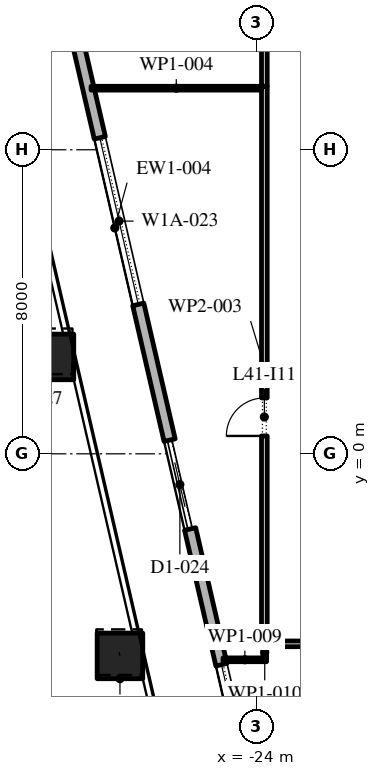
"""IFC4 building model, lengths in metres.
Left out: names, types, materials, properties, quantities, classifications, styles, units other than length and angle.
Written with IfcOpenShell. Run it as: python <this file> out.ifc"""

import sys

from ifc_helpers import new_model, si_unit, direction, frame, frame_2d, origin, origin_2d, place, context, subcontext, project, spatial, rectangle, extrude, element, fill, save


model = new_model("IFC4")
c1 = context("Model", 3, precision=1e-05, world=origin(), true_north=direction((0.0, 1.0)))
c2 = subcontext(c1, "Body", "Model", "MODEL_VIEW")
j1 = project(units=[si_unit("LENGTHUNIT", "METRE"), si_unit("PLANEANGLEUNIT", "RADIAN")], contexts=[c1])
p1 = place(None, origin())
s1 = spatial("IfcSite", under=j1, at=p1, CompositionType="ELEMENT")
p2 = place(p1, origin())
s2 = spatial("IfcBuilding", under=s1, at=p2, CompositionType="ELEMENT")
p3 = place(p2, frame((0.0, 0.0, 188.4)))
s3 = spatial("IfcBuildingStorey", under=s2, at=p3, CompositionType="ELEMENT", Elevation=188.4)
p4 = place(p3, frame((-29.415, 2.549, 0.0), z_axis=(-0.008132379523, 0.035027320373, 0.999353266483), x_axis=(-0.974090845759, -0.226157078617, 0.0)))
e1 = element("IfcColumn", 1, at=p4, inside=s3, PredefinedType="COLUMN", context=c2, shape_type="SweptSolid", body=[
    extrude(rectangle(XDim=1.2, YDim=1.2, at=origin_2d()), origin(), (0.0, 0.0, 1.0), 4.203),
])
p5 = place(p3, frame((-27.599, -5.318, 0.0), z_axis=(-0.005346057888, 0.023359948596, 0.999712824999), x_axis=(-0.974798272484, -0.223088161862, 0.0)))
e2 = element("IfcColumn", 2, at=p5, inside=s3, PredefinedType="COLUMN", context=c2, shape_type="SweptSolid", body=[
    extrude(rectangle(XDim=1.2, YDim=1.2, at=origin_2d()), origin(), (0.0, 0.0, 1.0), 4.201),
])
p6 = place(p3, frame((-33.157, 30.092, 0.0), z_axis=(0.0, 0.0, 1.0), x_axis=(0.224950279389, -0.974370243697, 0.0)))
e3 = element("IfcWall", 3, at=p6, inside=s3, PredefinedType="STANDARD", context=c2, shape_type="SweptSolid", body=[
    extrude(rectangle(XDim=49.5, YDim=0.3, at=frame_2d((24.75, 0.0))), origin(), (0.0, 0.0, 1.0), 4.0),
])
p7 = place(p6, frame((2.207, 0.0, 0.0)))
e4 = element("IfcOpeningElement", 4, at=p7, cuts=e3, PredefinedType="OPENING", context=c2, shape_type="SweptSolid", body=[
    extrude(rectangle(XDim=2.4, YDim=3.5, at=frame_2d((1.2, 1.75))), frame((0.0, 0.16, 0.0), z_axis=(0.0, -1.0, 0.0), x_axis=(1.0, 0.0, 0.0)), (0.0, 0.0, 1.0), 0.32),
])
p8 = place(p6, frame((8.121, 0.0, 0.45)))
e5 = element("IfcOpeningElement", 5, at=p8, cuts=e3, PredefinedType="OPENING", context=c2, shape_type="SweptSolid", body=[
    extrude(rectangle(XDim=4.5, YDim=2.825, at=frame_2d((2.25, 1.413))), frame((0.0, 0.16, 0.0), z_axis=(0.0, -1.0, 0.0), x_axis=(1.0, 0.0, 0.0)), (0.0, 0.0, 1.0), 0.32),
])
p9 = place(p6, frame((15.236, 0.0, 0.45)))
e6 = element("IfcOpeningElement", 6, at=p9, cuts=e3, PredefinedType="OPENING", context=c2, shape_type="SweptSolid", body=[
    extrude(rectangle(XDim=4.5, YDim=2.95, at=frame_2d((2.25, 1.475))), frame((0.0, 0.16, 0.0), z_axis=(0.0, -1.0, 0.0), x_axis=(1.0, 0.0, 0.0)), (0.0, 0.0, 1.0), 0.32),
])
p10 = place(p6, frame((22.35, 0.0, 0.45)))
e7 = element("IfcOpeningElement", 7, at=p10, cuts=e3, PredefinedType="OPENING", context=c2, shape_type="SweptSolid", body=[
    extrude(rectangle(XDim=4.5, YDim=3.0, at=frame_2d((2.25, 1.5))), frame((0.0, 0.16, 0.0), z_axis=(0.0, -1.0, 0.0), x_axis=(1.0, 0.0, 0.0)), (0.0, 0.0, 1.0), 0.32),
])
p11 = place(p6, frame((30.514, 0.0, 0.0)))
e8 = element("IfcOpeningElement", 8, at=p11, cuts=e3, PredefinedType="OPENING", context=c2, shape_type="SweptSolid", body=[
    extrude(rectangle(XDim=2.4, YDim=3.5, at=frame_2d((1.2, 1.75))), frame((0.0, 0.16, 0.0), z_axis=(0.0, -1.0, 0.0), x_axis=(1.0, 0.0, 0.0)), (0.0, 0.0, 1.0), 0.32),
])
p12 = place(p6, frame((36.579, 0.0, 0.45)))
e9 = element("IfcOpeningElement", 9, at=p12, cuts=e3, PredefinedType="OPENING", context=c2, shape_type="SweptSolid", body=[
    extrude(rectangle(XDim=4.5, YDim=3.05, at=frame_2d((2.25, 1.525))), frame((0.0, 0.16, 0.0), z_axis=(0.0, -1.0, 0.0), x_axis=(1.0, 0.0, 0.0)), (0.0, 0.0, 1.0), 0.32),
])
p13 = place(p6, frame((43.693, 0.0, 0.45)))
e10 = element("IfcOpeningElement", 10, at=p13, cuts=e3, PredefinedType="OPENING", context=c2, shape_type="SweptSolid", body=[
    extrude(rectangle(XDim=4.5, YDim=3.05, at=frame_2d((2.25, 1.525))), frame((0.0, 0.16, 0.0), z_axis=(0.0, -1.0, 0.0), x_axis=(1.0, 0.0, 0.0)), (0.0, 0.0, 1.0), 0.32),
])
p14 = place(p3, frame((-23.8, -5.075, 0.0), z_axis=(0.0, 0.0, 1.0), x_axis=(0.0, 1.0, 0.0)))
e11 = element("IfcWall", 11, at=p14, inside=s3, PredefinedType="PARTITIONING", context=c2, shape_type="SweptSolid", body=[
    extrude(rectangle(XDim=14.745, YDim=0.15, at=frame_2d((7.373, 0.0))), origin(), (0.0, 0.0, 1.0), 4.0),
])
p15 = place(p14, frame((5.545, 0.0, 0.0)))
e12 = element("IfcOpeningElement", 12, at=p15, cuts=e11, PredefinedType="OPENING", context=c2, shape_type="SweptSolid", body=[
    extrude(rectangle(XDim=1.0, YDim=2.1, at=frame_2d((0.5, 1.05))), frame((0.0, 0.085, 0.0), z_axis=(0.0, -1.0, 0.0), x_axis=(1.0, 0.0, 0.0)), (0.0, 0.0, 1.0), 0.17),
])
p16 = place(p3, frame((-23.875, 9.62, 0.0), z_axis=(0.0, 0.0, 1.0), x_axis=(-1.0, 0.0, 0.0)))
e13 = element("IfcWall", 13, at=p16, inside=s3, PredefinedType="PARTITIONING", context=c2, shape_type="SweptSolid", body=[
    extrude(rectangle(XDim=4.485, YDim=0.1, at=frame_2d((2.243, 0.0))), origin(), (0.0, 0.0, 1.0), 4.0),
])
p17 = place(p3, frame((-23.8, 9.67, 0.0), z_axis=(0.0, 0.0, 1.0), x_axis=(0.0, 1.0, 0.0)))
e14 = element("IfcWall", 14, at=p17, inside=s3, PredefinedType="PARTITIONING", context=c2, shape_type="SweptSolid", body=[
    extrude(rectangle(XDim=6.83, YDim=0.15, at=frame_2d((3.415, 0.0))), origin(), (0.0, 0.0, 1.0), 4.0),
])
p18 = place(p17, frame((1.48, 0.0, 0.0)))
e15 = element("IfcOpeningElement", 15, at=p18, cuts=e14, PredefinedType="OPENING", context=c2, shape_type="SweptSolid", body=[
    extrude(rectangle(XDim=1.0, YDim=2.1, at=frame_2d((0.5, 1.05))), frame((0.0, 0.085, 0.0), z_axis=(0.0, -1.0, 0.0), x_axis=(1.0, 0.0, 0.0)), (0.0, 0.0, 1.0), 0.17),
])
p19 = place(p3, frame((-23.74, -5.42, 0.0), z_axis=(0.0, 0.0, 1.0), x_axis=(-1.0, 0.0, 0.0)))
e16 = element("IfcWall", 16, at=p19, inside=s3, PredefinedType="PARTITIONING", context=c2, shape_type="SweptSolid", body=[
    extrude(rectangle(XDim=1.147, YDim=0.1, at=frame_2d((0.573, 0.0))), origin(), (0.0, 0.0, 1.0), 4.0),
])
p20 = place(p3, frame((-23.79, -5.075, 0.0), z_axis=(0.0, 0.0, 1.0), x_axis=(0.0, -1.0, 0.0)))
e17 = element("IfcWall", 17, at=p20, inside=s3, PredefinedType="PARTITIONING", context=c2, shape_type="SweptSolid", body=[
    extrude(rectangle(XDim=0.295, YDim=0.1, at=frame_2d((0.147, 0.0))), origin(), (0.0, 0.0, 1.0), 4.0),
])
p21 = place(p3, frame((-10.05, -5.0, 0.0), z_axis=(0.0, 0.0, 1.0), x_axis=(-1.0, 0.0, 0.0)))
e18 = element("IfcWall", 18, at=p21, inside=s3, PredefinedType="PARTITIONING", context=c2, shape_type="SweptSolid", body=[
    extrude(rectangle(XDim=13.665, YDim=0.15, at=frame_2d((6.833, 0.0))), origin(), (0.0, 0.0, 1.0), 4.0),
])
p22 = place(p21, frame((5.09, 0.0, 0.0)))
e19 = element("IfcOpeningElement", 19, at=p22, cuts=e18, PredefinedType="OPENING", context=c2, shape_type="SweptSolid", body=[
    extrude(rectangle(XDim=1.0, YDim=2.1, at=frame_2d((0.5, 1.05))), frame((0.0, 0.085, 0.0), z_axis=(0.0, -1.0, 0.0), x_axis=(1.0, 0.0, 0.0)), (0.0, 0.0, 1.0), 0.17),
])
p23 = place(p10, origin())
e20 = element("IfcWindow", 20, at=p23, inside=s3, PartitioningType="DOUBLE_PANEL_VERTICAL", PredefinedType="WINDOW", context=c2, shape_type="SweptSolid", body=[
    extrude(rectangle(XDim=4.5, YDim=3.0, at=frame_2d((2.25, 1.5))), frame((0.0, 0.03, 0.0), z_axis=(0.0, -1.0, 0.0), x_axis=(1.0, 0.0, 0.0)), (0.0, 0.0, 1.0), 0.06),
])
fill(e7, e20)
p24 = place(p11, origin())
e21 = element("IfcDoor", 21, at=p24, inside=s3, OperationType="DOUBLE_DOOR_SLIDING", PredefinedType="DOOR", context=c2, shape_type="SweptSolid", body=[
    extrude(rectangle(XDim=2.4, YDim=3.5, at=frame_2d((1.2, 1.75))), frame((0.0, 0.025, 0.0), z_axis=(0.0, -1.0, 0.0), x_axis=(1.0, 0.0, 0.0)), (0.0, 0.0, 1.0), 0.05),
])
fill(e8, e21)
p25 = place(p12, origin())
e22 = element("IfcWindow", 22, at=p25, inside=s3, PartitioningType="DOUBLE_PANEL_VERTICAL", PredefinedType="WINDOW", context=c2, shape_type="SweptSolid", body=[
    extrude(rectangle(XDim=4.5, YDim=3.05, at=frame_2d((2.25, 1.525))), frame((0.0, 0.03, 0.0), z_axis=(0.0, -1.0, 0.0), x_axis=(1.0, 0.0, 0.0)), (0.0, 0.0, 1.0), 0.06),
])
fill(e9, e22)
p26 = place(p15, origin())
e23 = element("IfcDoor", 23, at=p26, inside=s3, OperationType="SINGLE_SWING_RIGHT", PredefinedType="DOOR", context=c2, shape_type="SweptSolid", body=[
    extrude(rectangle(XDim=1.0, YDim=2.1, at=frame_2d((0.5, 1.05))), frame((0.0, 0.025, 0.0), z_axis=(0.0, -1.0, 0.0), x_axis=(1.0, 0.0, 0.0)), (0.0, 0.0, 1.0), 0.05),
])
fill(e12, e23)
save(model, sys.argv[1])
